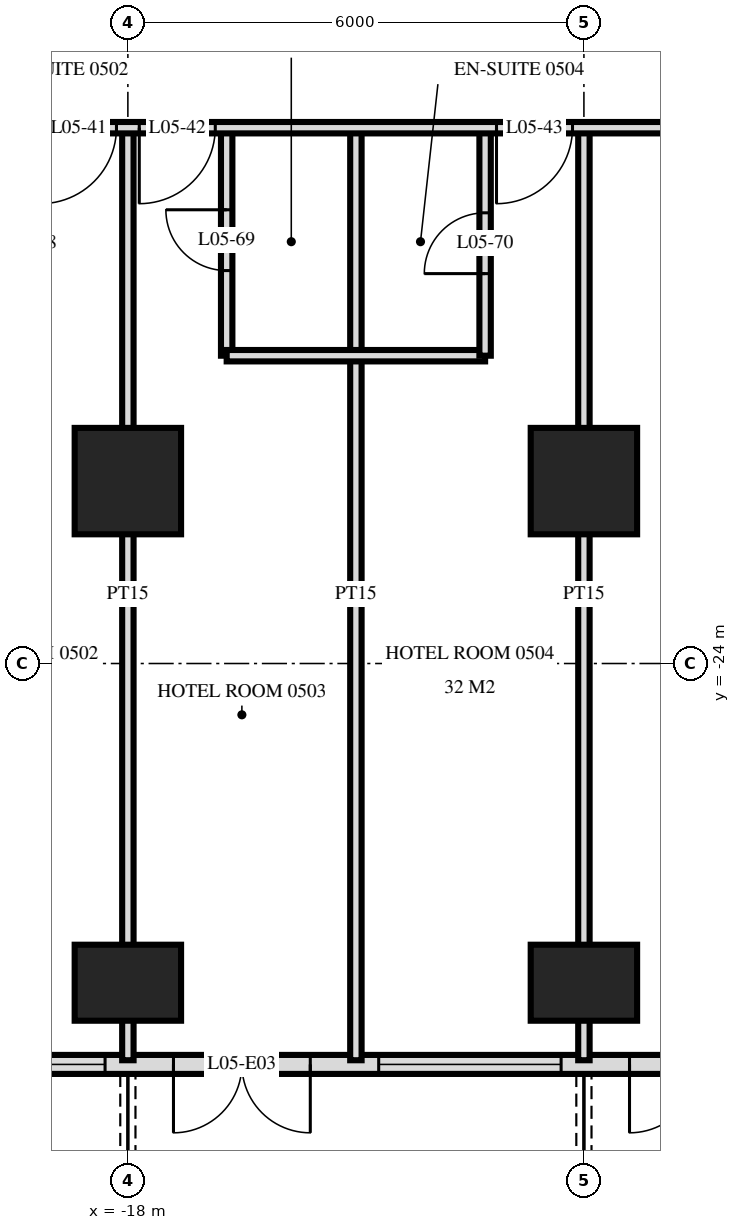
"""IFC4 building model, lengths in metres.
Left out: names, types, materials, properties, quantities, classifications, styles, units other than length and angle.
Written with IfcOpenShell. Run it as: python <this file> out.ifc"""

import sys

from ifc_helpers import new_model, si_unit, direction, frame, frame_2d, origin, origin_2d, place, context, subcontext, project, spatial, rectangle, extrude, element, fill, save


model = new_model("IFC4")
c1 = context("Model", 3, precision=1e-05, world=origin(), true_north=direction((0.0, 1.0)))
c2 = subcontext(c1, "Body", "Model", "MODEL_VIEW")
j1 = project(units=[si_unit("LENGTHUNIT", "METRE"), si_unit("PLANEANGLEUNIT", "RADIAN")], contexts=[c1])
p1 = place(None, origin())
s1 = spatial("IfcSite", under=j1, at=p1, CompositionType="ELEMENT")
p2 = place(p1, origin())
s2 = spatial("IfcBuilding", under=s1, at=p2, CompositionType="ELEMENT")
p3 = place(p2, frame((0.0, 0.0, 27.6)))
s3 = spatial("IfcBuildingStorey", under=s2, at=p3, CompositionType="ELEMENT", Elevation=27.6)
p4 = place(p3, frame((-18.0, -28.2, 0.0), z_axis=(0.0, 0.0, 1.0), x_axis=(1.0, 0.0, 0.0)))
e1 = element("IfcColumn", 1, at=p4, inside=s3, PredefinedType="COLUMN", context=c2, shape_type="SweptSolid", body=[
    extrude(rectangle(XDim=1.4, YDim=1.0, at=origin_2d()), origin(), (0.0, 0.0, 1.0), 3.6),
])
p5 = place(p3, frame((-18.0, -21.6, 0.0), z_axis=(0.0, 0.0, 1.0), x_axis=(1.0, 0.0, 0.0)))
e2 = element("IfcColumn", 2, at=p5, inside=s3, PredefinedType="COLUMN", context=c2, shape_type="SweptSolid", body=[
    extrude(rectangle(XDim=1.4, YDim=1.4, at=origin_2d()), origin(), (0.0, 0.0, 1.0), 3.6),
])
p6 = place(p3, frame((-12.0, -28.2, 0.0), z_axis=(0.0, 0.0, 1.0), x_axis=(1.0, 0.0, 0.0)))
e3 = element("IfcColumn", 3, at=p6, inside=s3, PredefinedType="COLUMN", context=c2, shape_type="SweptSolid", body=[
    extrude(rectangle(XDim=1.4, YDim=1.0, at=origin_2d()), origin(), (0.0, 0.0, 1.0), 3.6),
])
p7 = place(p3, frame((-12.0, -21.6, 0.0), z_axis=(0.0, 0.0, 1.0), x_axis=(1.0, 0.0, 0.0)))
e4 = element("IfcColumn", 4, at=p7, inside=s3, PredefinedType="COLUMN", context=c2, shape_type="SweptSolid", body=[
    extrude(rectangle(XDim=1.4, YDim=1.4, at=origin_2d()), origin(), (0.0, 0.0, 1.0), 3.6),
])
p8 = place(p3, frame((-28.775, -29.275, 0.0), z_axis=(0.0, 0.0, 1.0), x_axis=(1.0, 0.0, 0.0)))
e5 = element("IfcWall", 5, at=p8, inside=s3, PredefinedType="SOLIDWALL", context=c2, shape_type="SweptSolid", body=[
    extrude(rectangle(XDim=57.551, YDim=0.25, at=frame_2d((28.775, 0.0))), origin(), (0.0, 0.0, 1.0), 3.32),
])
p9 = place(p8, frame((0.575, 0.0, 0.0)))
e6 = element("IfcOpeningElement", 6, at=p9, cuts=e5, PredefinedType="OPENING", context=c2, shape_type="SweptSolid", body=[
    extrude(rectangle(XDim=1.8, YDim=2.4, at=frame_2d((0.9, 1.2))), frame((0.0, 0.135, 0.0), z_axis=(0.0, -1.0, 0.0), x_axis=(1.0, 0.0, 0.0)), (0.0, 0.0, 1.0), 0.27),
])
p10 = place(p8, frame((5.375, 0.0, 0.0)))
e7 = element("IfcOpeningElement", 7, at=p10, cuts=e5, PredefinedType="OPENING", context=c2, shape_type="SweptSolid", body=[
    extrude(rectangle(XDim=1.8, YDim=2.4, at=frame_2d((0.9, 1.2))), frame((0.0, 0.135, 0.0), z_axis=(0.0, -1.0, 0.0), x_axis=(1.0, 0.0, 0.0)), (0.0, 0.0, 1.0), 0.27),
])
p11 = place(p8, frame((8.075, 0.0, 0.3)))
e8 = element("IfcOpeningElement", 8, at=p11, cuts=e5, PredefinedType="OPENING", context=c2, shape_type="SweptSolid", body=[
    extrude(rectangle(XDim=2.4, YDim=2.1, at=frame_2d((1.2, 1.05))), frame((0.0, 0.135, 0.0), z_axis=(0.0, -1.0, 0.0), x_axis=(1.0, 0.0, 0.0)), (0.0, 0.0, 1.0), 0.27),
])
p12 = place(p8, frame((11.375, 0.0, 0.0)))
e9 = element("IfcOpeningElement", 9, at=p12, cuts=e5, PredefinedType="OPENING", context=c2, shape_type="SweptSolid", body=[
    extrude(rectangle(XDim=1.8, YDim=2.4, at=frame_2d((0.9, 1.2))), frame((0.0, 0.135, 0.0), z_axis=(0.0, -1.0, 0.0), x_axis=(1.0, 0.0, 0.0)), (0.0, 0.0, 1.0), 0.27),
])
p13 = place(p8, frame((14.075, 0.0, 0.3)))
e10 = element("IfcOpeningElement", 10, at=p13, cuts=e5, PredefinedType="OPENING", context=c2, shape_type="SweptSolid", body=[
    extrude(rectangle(XDim=2.4, YDim=2.1, at=frame_2d((1.2, 1.05))), frame((0.0, 0.135, 0.0), z_axis=(0.0, -1.0, 0.0), x_axis=(1.0, 0.0, 0.0)), (0.0, 0.0, 1.0), 0.27),
])
p14 = place(p8, frame((17.375, 0.0, 0.0)))
e11 = element("IfcOpeningElement", 11, at=p14, cuts=e5, PredefinedType="OPENING", context=c2, shape_type="SweptSolid", body=[
    extrude(rectangle(XDim=1.8, YDim=2.4, at=frame_2d((0.9, 1.2))), frame((0.0, 0.135, 0.0), z_axis=(0.0, -1.0, 0.0), x_axis=(1.0, 0.0, 0.0)), (0.0, 0.0, 1.0), 0.27),
])
p15 = place(p8, frame((20.075, 0.0, 0.3)))
e12 = element("IfcOpeningElement", 12, at=p15, cuts=e5, PredefinedType="OPENING", context=c2, shape_type="SweptSolid", body=[
    extrude(rectangle(XDim=2.4, YDim=2.1, at=frame_2d((1.2, 1.05))), frame((0.0, 0.135, 0.0), z_axis=(0.0, -1.0, 0.0), x_axis=(1.0, 0.0, 0.0)), (0.0, 0.0, 1.0), 0.27),
])
p16 = place(p8, frame((23.075, 0.0, 0.3)))
e13 = element("IfcOpeningElement", 13, at=p16, cuts=e5, PredefinedType="OPENING", context=c2, shape_type="SweptSolid", body=[
    extrude(rectangle(XDim=2.4, YDim=2.1, at=frame_2d((1.2, 1.05))), frame((0.0, 0.135, 0.0), z_axis=(0.0, -1.0, 0.0), x_axis=(1.0, 0.0, 0.0)), (0.0, 0.0, 1.0), 0.27),
])
p17 = place(p8, frame((26.375, 0.0, 0.0)))
e14 = element("IfcOpeningElement", 14, at=p17, cuts=e5, PredefinedType="OPENING", context=c2, shape_type="SweptSolid", body=[
    extrude(rectangle(XDim=1.8, YDim=2.4, at=frame_2d((0.9, 1.2))), frame((0.0, 0.135, 0.0), z_axis=(0.0, -1.0, 0.0), x_axis=(1.0, 0.0, 0.0)), (0.0, 0.0, 1.0), 0.27),
])
p18 = place(p8, frame((29.375, 0.0, 0.0)))
e15 = element("IfcOpeningElement", 15, at=p18, cuts=e5, PredefinedType="OPENING", context=c2, shape_type="SweptSolid", body=[
    extrude(rectangle(XDim=1.8, YDim=2.4, at=frame_2d((0.9, 1.2))), frame((0.0, 0.135, 0.0), z_axis=(0.0, -1.0, 0.0), x_axis=(1.0, 0.0, 0.0)), (0.0, 0.0, 1.0), 0.27),
])
p19 = place(p8, frame((32.075, 0.0, 0.3)))
e16 = element("IfcOpeningElement", 16, at=p19, cuts=e5, PredefinedType="OPENING", context=c2, shape_type="SweptSolid", body=[
    extrude(rectangle(XDim=2.4, YDim=2.1, at=frame_2d((1.2, 1.05))), frame((0.0, 0.135, 0.0), z_axis=(0.0, -1.0, 0.0), x_axis=(1.0, 0.0, 0.0)), (0.0, 0.0, 1.0), 0.27),
])
p20 = place(p8, frame((35.375, 0.0, 0.0)))
e17 = element("IfcOpeningElement", 17, at=p20, cuts=e5, PredefinedType="OPENING", context=c2, shape_type="SweptSolid", body=[
    extrude(rectangle(XDim=1.8, YDim=2.4, at=frame_2d((0.9, 1.2))), frame((0.0, 0.135, 0.0), z_axis=(0.0, -1.0, 0.0), x_axis=(1.0, 0.0, 0.0)), (0.0, 0.0, 1.0), 0.27),
])
p21 = place(p8, frame((38.075, 0.0, 0.3)))
e18 = element("IfcOpeningElement", 18, at=p21, cuts=e5, PredefinedType="OPENING", context=c2, shape_type="SweptSolid", body=[
    extrude(rectangle(XDim=2.4, YDim=2.1, at=frame_2d((1.2, 1.05))), frame((0.0, 0.135, 0.0), z_axis=(0.0, -1.0, 0.0), x_axis=(1.0, 0.0, 0.0)), (0.0, 0.0, 1.0), 0.27),
])
p22 = place(p8, frame((41.375, 0.0, 0.0)))
e19 = element("IfcOpeningElement", 19, at=p22, cuts=e5, PredefinedType="OPENING", context=c2, shape_type="SweptSolid", body=[
    extrude(rectangle(XDim=1.8, YDim=2.4, at=frame_2d((0.9, 1.2))), frame((0.0, 0.135, 0.0), z_axis=(0.0, -1.0, 0.0), x_axis=(1.0, 0.0, 0.0)), (0.0, 0.0, 1.0), 0.27),
])
p23 = place(p8, frame((44.075, 0.0, 0.3)))
e20 = element("IfcOpeningElement", 20, at=p23, cuts=e5, PredefinedType="OPENING", context=c2, shape_type="SweptSolid", body=[
    extrude(rectangle(XDim=2.4, YDim=2.1, at=frame_2d((1.2, 1.05))), frame((0.0, 0.135, 0.0), z_axis=(0.0, -1.0, 0.0), x_axis=(1.0, 0.0, 0.0)), (0.0, 0.0, 1.0), 0.27),
])
p24 = place(p8, frame((47.075, 0.0, 0.3)))
e21 = element("IfcOpeningElement", 21, at=p24, cuts=e5, PredefinedType="OPENING", context=c2, shape_type="SweptSolid", body=[
    extrude(rectangle(XDim=2.4, YDim=2.1, at=frame_2d((1.2, 1.05))), frame((0.0, 0.135, 0.0), z_axis=(0.0, -1.0, 0.0), x_axis=(1.0, 0.0, 0.0)), (0.0, 0.0, 1.0), 0.27),
])
p25 = place(p8, frame((50.375, 0.0, 0.0)))
e22 = element("IfcOpeningElement", 22, at=p25, cuts=e5, PredefinedType="OPENING", context=c2, shape_type="SweptSolid", body=[
    extrude(rectangle(XDim=1.8, YDim=2.4, at=frame_2d((0.9, 1.2))), frame((0.0, 0.135, 0.0), z_axis=(0.0, -1.0, 0.0), x_axis=(1.0, 0.0, 0.0)), (0.0, 0.0, 1.0), 0.27),
])
p26 = place(p8, frame((53.375, 0.0, 0.0)))
e23 = element("IfcOpeningElement", 23, at=p26, cuts=e5, PredefinedType="OPENING", context=c2, shape_type="SweptSolid", body=[
    extrude(rectangle(XDim=1.8, YDim=2.4, at=frame_2d((0.9, 1.2))), frame((0.0, 0.135, 0.0), z_axis=(0.0, -1.0, 0.0), x_axis=(1.0, 0.0, 0.0)), (0.0, 0.0, 1.0), 0.27),
])
p27 = place(p3, frame((-12.0, -29.22, 0.0), z_axis=(0.0, 0.0, 1.0), x_axis=(0.0, 1.0, 0.0)))
e24 = element("IfcWall", 24, at=p27, inside=s3, PredefinedType="PARTITIONING", context=c2, shape_type="SweptSolid", body=[
    extrude(rectangle(XDim=12.27, YDim=0.15, at=frame_2d((6.135, 0.0))), origin(), (0.0, 0.0, 1.0), 3.32),
])
p28 = place(p3, frame((-13.3, -19.95, 0.0), z_axis=(0.0, 0.0, 1.0), x_axis=(0.0, 1.0, 0.0)))
e25 = element("IfcWall", 25, at=p28, inside=s3, PredefinedType="PARTITIONING", context=c2, shape_type="SweptSolid", body=[
    extrude(rectangle(XDim=3.0, YDim=0.15, at=frame_2d((1.5, 0.0))), origin(), (0.0, 0.0, 1.0), 3.32),
])
p29 = place(p28, frame((1.08, 0.0, 0.0)))
e26 = element("IfcOpeningElement", 26, at=p29, cuts=e25, PredefinedType="OPENING", context=c2, shape_type="SweptSolid", body=[
    extrude(rectangle(XDim=0.8, YDim=2.1, at=frame_2d((0.4, 1.05))), frame((0.0, 0.085, 0.0), z_axis=(0.0, -1.0, 0.0), x_axis=(1.0, 0.0, 0.0)), (0.0, 0.0, 1.0), 0.17),
])
p30 = place(p3, frame((-15.0, -29.22, 0.0), z_axis=(0.0, 0.0, 1.0), x_axis=(0.0, 1.0, 0.0)))
e27 = element("IfcWall", 27, at=p30, inside=s3, PredefinedType="PARTITIONING", context=c2, shape_type="SweptSolid", body=[
    extrude(rectangle(XDim=12.27, YDim=0.15, at=frame_2d((6.135, 0.0))), origin(), (0.0, 0.0, 1.0), 3.32),
])
p31 = place(p3, frame((-16.7, -19.95, 0.0), z_axis=(0.0, 0.0, 1.0), x_axis=(0.0, 1.0, 0.0)))
e28 = element("IfcWall", 28, at=p31, inside=s3, PredefinedType="PARTITIONING", context=c2, shape_type="SweptSolid", body=[
    extrude(rectangle(XDim=3.0, YDim=0.15, at=frame_2d((1.5, 0.0))), origin(), (0.0, 0.0, 1.0), 3.32),
])
p32 = place(p31, frame((1.12, 0.0, 0.0)))
e29 = element("IfcOpeningElement", 29, at=p32, cuts=e28, PredefinedType="OPENING", context=c2, shape_type="SweptSolid", body=[
    extrude(rectangle(XDim=0.8, YDim=2.1, at=frame_2d((0.4, 1.05))), frame((0.0, 0.085, 0.0), z_axis=(0.0, -1.0, 0.0), x_axis=(1.0, 0.0, 0.0)), (0.0, 0.0, 1.0), 0.17),
])
p33 = place(p3, frame((-18.0, -29.22, 0.0), z_axis=(0.0, 0.0, 1.0), x_axis=(0.0, 1.0, 0.0)))
e30 = element("IfcWall", 30, at=p33, inside=s3, PredefinedType="PARTITIONING", context=c2, shape_type="SweptSolid", body=[
    extrude(rectangle(XDim=12.27, YDim=0.15, at=frame_2d((6.135, 0.0))), origin(), (0.0, 0.0, 1.0), 3.32),
])
p34 = place(p3, frame((-16.7, -19.95, 0.0), z_axis=(0.0, 0.0, 1.0), x_axis=(1.0, 0.0, 0.0)))
e31 = element("IfcWall", 31, at=p34, inside=s3, PredefinedType="PARTITIONING", context=c2, shape_type="SweptSolid", body=[
    extrude(rectangle(XDim=3.4, YDim=0.15, at=frame_2d((1.7, 0.0))), origin(), (0.0, 0.0, 1.0), 3.32),
])
p35 = place(p3, frame((-33.12, -16.95, 0.0), z_axis=(0.0, 0.0, 1.0), x_axis=(1.0, 0.0, 0.0)))
e32 = element("IfcWall", 32, at=p35, inside=s3, PredefinedType="PARTITIONING", context=c2, shape_type="SweptSolid", body=[
    extrude(rectangle(XDim=66.24, YDim=0.15, at=frame_2d((33.12, 0.0))), origin(), (0.0, 0.0, 1.0), 3.32),
])
p36 = place(p35, frame((9.27, 0.0, 0.0)))
e33 = element("IfcOpeningElement", 33, at=p36, cuts=e32, PredefinedType="OPENING", context=c2, shape_type="SweptSolid", body=[
    extrude(rectangle(XDim=1.0, YDim=2.1, at=frame_2d((0.5, 1.05))), frame((0.0, 0.085, 0.0), z_axis=(0.0, -1.0, 0.0), x_axis=(1.0, 0.0, 0.0)), (0.0, 0.0, 1.0), 0.17),
])
p37 = place(p35, frame((13.97, 0.0, 0.0)))
e34 = element("IfcOpeningElement", 34, at=p37, cuts=e32, PredefinedType="OPENING", context=c2, shape_type="SweptSolid", body=[
    extrude(rectangle(XDim=1.0, YDim=2.1, at=frame_2d((0.5, 1.05))), frame((0.0, 0.085, 0.0), z_axis=(0.0, -1.0, 0.0), x_axis=(1.0, 0.0, 0.0)), (0.0, 0.0, 1.0), 0.17),
])
p38 = place(p35, frame((15.27, 0.0, 0.0)))
e35 = element("IfcOpeningElement", 35, at=p38, cuts=e32, PredefinedType="OPENING", context=c2, shape_type="SweptSolid", body=[
    extrude(rectangle(XDim=1.0, YDim=2.1, at=frame_2d((0.5, 1.05))), frame((0.0, 0.085, 0.0), z_axis=(0.0, -1.0, 0.0), x_axis=(1.0, 0.0, 0.0)), (0.0, 0.0, 1.0), 0.17),
])
p39 = place(p35, frame((19.97, 0.0, 0.0)))
e36 = element("IfcOpeningElement", 36, at=p39, cuts=e32, PredefinedType="OPENING", context=c2, shape_type="SweptSolid", body=[
    extrude(rectangle(XDim=1.0, YDim=2.1, at=frame_2d((0.5, 1.05))), frame((0.0, 0.085, 0.0), z_axis=(0.0, -1.0, 0.0), x_axis=(1.0, 0.0, 0.0)), (0.0, 0.0, 1.0), 0.17),
])
p40 = place(p35, frame((22.27, 0.0, 0.0)))
e37 = element("IfcOpeningElement", 37, at=p40, cuts=e32, PredefinedType="OPENING", context=c2, shape_type="SweptSolid", body=[
    extrude(rectangle(XDim=1.0, YDim=2.1, at=frame_2d((0.5, 1.05))), frame((0.0, 0.085, 0.0), z_axis=(0.0, -1.0, 0.0), x_axis=(1.0, 0.0, 0.0)), (0.0, 0.0, 1.0), 0.17),
])
p41 = place(p35, frame((28.97, 0.0, 0.0)))
e38 = element("IfcOpeningElement", 38, at=p41, cuts=e32, PredefinedType="OPENING", context=c2, shape_type="SweptSolid", body=[
    extrude(rectangle(XDim=1.0, YDim=2.1, at=frame_2d((0.5, 1.05))), frame((0.0, 0.085, 0.0), z_axis=(0.0, -1.0, 0.0), x_axis=(1.0, 0.0, 0.0)), (0.0, 0.0, 1.0), 0.17),
])
p42 = place(p35, frame((30.27, 0.0, 0.0)))
e39 = element("IfcOpeningElement", 39, at=p42, cuts=e32, PredefinedType="OPENING", context=c2, shape_type="SweptSolid", body=[
    extrude(rectangle(XDim=1.0, YDim=2.1, at=frame_2d((0.5, 1.05))), frame((0.0, 0.085, 0.0), z_axis=(0.0, -1.0, 0.0), x_axis=(1.0, 0.0, 0.0)), (0.0, 0.0, 1.0), 0.17),
])
p43 = place(p35, frame((34.97, 0.0, 0.0)))
e40 = element("IfcOpeningElement", 40, at=p43, cuts=e32, PredefinedType="OPENING", context=c2, shape_type="SweptSolid", body=[
    extrude(rectangle(XDim=1.0, YDim=2.1, at=frame_2d((0.5, 1.05))), frame((0.0, 0.085, 0.0), z_axis=(0.0, -1.0, 0.0), x_axis=(1.0, 0.0, 0.0)), (0.0, 0.0, 1.0), 0.17),
])
p44 = place(p35, frame((36.27, 0.0, 0.0)))
e41 = element("IfcOpeningElement", 41, at=p44, cuts=e32, PredefinedType="OPENING", context=c2, shape_type="SweptSolid", body=[
    extrude(rectangle(XDim=1.0, YDim=2.1, at=frame_2d((0.5, 1.05))), frame((0.0, 0.085, 0.0), z_axis=(0.0, -1.0, 0.0), x_axis=(1.0, 0.0, 0.0)), (0.0, 0.0, 1.0), 0.17),
])
p45 = place(p35, frame((40.97, 0.0, 0.0)))
e42 = element("IfcOpeningElement", 42, at=p45, cuts=e32, PredefinedType="OPENING", context=c2, shape_type="SweptSolid", body=[
    extrude(rectangle(XDim=1.0, YDim=2.1, at=frame_2d((0.5, 1.05))), frame((0.0, 0.085, 0.0), z_axis=(0.0, -1.0, 0.0), x_axis=(1.0, 0.0, 0.0)), (0.0, 0.0, 1.0), 0.17),
])
p46 = place(p35, frame((42.27, 0.0, 0.0)))
e43 = element("IfcOpeningElement", 43, at=p46, cuts=e32, PredefinedType="OPENING", context=c2, shape_type="SweptSolid", body=[
    extrude(rectangle(XDim=1.0, YDim=2.1, at=frame_2d((0.5, 1.05))), frame((0.0, 0.085, 0.0), z_axis=(0.0, -1.0, 0.0), x_axis=(1.0, 0.0, 0.0)), (0.0, 0.0, 1.0), 0.17),
])
p47 = place(p35, frame((46.97, 0.0, 0.0)))
e44 = element("IfcOpeningElement", 44, at=p47, cuts=e32, PredefinedType="OPENING", context=c2, shape_type="SweptSolid", body=[
    extrude(rectangle(XDim=1.0, YDim=2.1, at=frame_2d((0.5, 1.05))), frame((0.0, 0.085, 0.0), z_axis=(0.0, -1.0, 0.0), x_axis=(1.0, 0.0, 0.0)), (0.0, 0.0, 1.0), 0.17),
])
p48 = place(p35, frame((48.27, 0.0, 0.0)))
e45 = element("IfcOpeningElement", 45, at=p48, cuts=e32, PredefinedType="OPENING", context=c2, shape_type="SweptSolid", body=[
    extrude(rectangle(XDim=1.0, YDim=2.1, at=frame_2d((0.5, 1.05))), frame((0.0, 0.085, 0.0), z_axis=(0.0, -1.0, 0.0), x_axis=(1.0, 0.0, 0.0)), (0.0, 0.0, 1.0), 0.17),
])
p49 = place(p35, frame((52.97, 0.0, 0.0)))
e46 = element("IfcOpeningElement", 46, at=p49, cuts=e32, PredefinedType="OPENING", context=c2, shape_type="SweptSolid", body=[
    extrude(rectangle(XDim=1.0, YDim=2.1, at=frame_2d((0.5, 1.05))), frame((0.0, 0.085, 0.0), z_axis=(0.0, -1.0, 0.0), x_axis=(1.0, 0.0, 0.0)), (0.0, 0.0, 1.0), 0.17),
])
p50 = place(p35, frame((54.27, 0.0, 0.0)))
e47 = element("IfcOpeningElement", 47, at=p50, cuts=e32, PredefinedType="OPENING", context=c2, shape_type="SweptSolid", body=[
    extrude(rectangle(XDim=1.0, YDim=2.1, at=frame_2d((0.5, 1.05))), frame((0.0, 0.085, 0.0), z_axis=(0.0, -1.0, 0.0), x_axis=(1.0, 0.0, 0.0)), (0.0, 0.0, 1.0), 0.17),
])
p51 = place(p35, frame((4.4, 0.0, 0.0)))
e48 = element("IfcOpeningElement", 48, at=p51, cuts=e32, PredefinedType="OPENING", context=c2, shape_type="SweptSolid", body=[
    extrude(rectangle(XDim=1.0, YDim=2.1, at=frame_2d((0.5, 1.05))), frame((0.0, 0.085, 0.0), z_axis=(0.0, -1.0, 0.0), x_axis=(1.0, 0.0, 0.0)), (0.0, 0.0, 1.0), 0.17),
])
p52 = place(p35, frame((60.8, 0.0, 0.0)))
e49 = element("IfcOpeningElement", 49, at=p52, cuts=e32, PredefinedType="OPENING", context=c2, shape_type="SweptSolid", body=[
    extrude(rectangle(XDim=1.0, YDim=2.1, at=frame_2d((0.5, 1.05))), frame((0.0, 0.085, 0.0), z_axis=(0.0, -1.0, 0.0), x_axis=(1.0, 0.0, 0.0)), (0.0, 0.0, 1.0), 0.17),
])
p53 = place(p11, origin())
e50 = element("IfcWindow", 50, at=p53, inside=s3, PartitioningType="SINGLE_PANEL", PredefinedType="WINDOW", context=c2, shape_type="SweptSolid", body=[
    extrude(rectangle(XDim=2.4, YDim=2.1, at=frame_2d((1.2, 1.05))), frame((0.0, 0.03, 0.0), z_axis=(0.0, -1.0, 0.0), x_axis=(1.0, 0.0, 0.0)), (0.0, 0.0, 1.0), 0.06),
])
fill(e8, e50)
p54 = place(p12, frame((0.9, 0.0, 0.0), z_axis=(0.0, 0.0, 1.0), x_axis=(-1.0, 0.0, 0.0)))
e51 = element("IfcDoor", 51, at=p54, inside=s3, OperationType="DOUBLE_DOOR_SINGLE_SWING", PredefinedType="DOOR", context=c2, shape_type="SweptSolid", body=[
    extrude(rectangle(XDim=1.8, YDim=2.4, at=frame_2d((0.0, 1.2))), frame((0.0, -0.025, 0.0), z_axis=(0.0, 1.0, 0.0), x_axis=(-1.0, 0.0, 0.0)), (0.0, 0.0, 1.0), 0.05),
])
fill(e9, e51)
p55 = place(p13, origin())
e52 = element("IfcWindow", 52, at=p55, inside=s3, PartitioningType="SINGLE_PANEL", PredefinedType="WINDOW", context=c2, shape_type="SweptSolid", body=[
    extrude(rectangle(XDim=2.4, YDim=2.1, at=frame_2d((1.2, 1.05))), frame((0.0, 0.03, 0.0), z_axis=(0.0, -1.0, 0.0), x_axis=(1.0, 0.0, 0.0)), (0.0, 0.0, 1.0), 0.06),
])
fill(e10, e52)
p56 = place(p14, frame((0.9, 0.0, 0.0), z_axis=(0.0, 0.0, 1.0), x_axis=(-1.0, 0.0, 0.0)))
e53 = element("IfcDoor", 53, at=p56, inside=s3, OperationType="DOUBLE_DOOR_SINGLE_SWING", PredefinedType="DOOR", context=c2, shape_type="SweptSolid", body=[
    extrude(rectangle(XDim=1.8, YDim=2.4, at=frame_2d((0.0, 1.2))), frame((0.0, -0.025, 0.0), z_axis=(0.0, 1.0, 0.0), x_axis=(-1.0, 0.0, 0.0)), (0.0, 0.0, 1.0), 0.05),
])
fill(e11, e53)
p57 = place(p37, frame((0.5, 0.0, 0.0), z_axis=(0.0, 0.0, 1.0), x_axis=(-1.0, 0.0, 0.0)))
e54 = element("IfcDoor", 54, at=p57, inside=s3, OperationType="SINGLE_SWING_LEFT", PredefinedType="DOOR", context=c2, shape_type="SweptSolid", body=[
    extrude(rectangle(XDim=1.0, YDim=2.1, at=frame_2d((0.0, 1.05))), frame((0.0, -0.025, 0.0), z_axis=(0.0, 1.0, 0.0), x_axis=(-1.0, 0.0, 0.0)), (0.0, 0.0, 1.0), 0.05),
])
fill(e34, e54)
p58 = place(p38, frame((0.5, 0.0, 0.0), z_axis=(0.0, 0.0, 1.0), x_axis=(-1.0, 0.0, 0.0)))
e55 = element("IfcDoor", 55, at=p58, inside=s3, OperationType="SINGLE_SWING_LEFT", PredefinedType="DOOR", context=c2, shape_type="SweptSolid", body=[
    extrude(rectangle(XDim=1.0, YDim=2.1, at=frame_2d((0.0, 1.05))), frame((0.0, -0.025, 0.0), z_axis=(0.0, 1.0, 0.0), x_axis=(-1.0, 0.0, 0.0)), (0.0, 0.0, 1.0), 0.05),
])
fill(e35, e55)
p59 = place(p39, frame((0.5, 0.0, 0.0), z_axis=(0.0, 0.0, 1.0), x_axis=(-1.0, 0.0, 0.0)))
e56 = element("IfcDoor", 56, at=p59, inside=s3, OperationType="SINGLE_SWING_LEFT", PredefinedType="DOOR", context=c2, shape_type="SweptSolid", body=[
    extrude(rectangle(XDim=1.0, YDim=2.1, at=frame_2d((0.0, 1.05))), frame((0.0, -0.025, 0.0), z_axis=(0.0, 1.0, 0.0), x_axis=(-1.0, 0.0, 0.0)), (0.0, 0.0, 1.0), 0.05),
])
fill(e36, e56)
p60 = place(p32, origin())
e57 = element("IfcDoor", 57, at=p60, inside=s3, OperationType="SINGLE_SWING_LEFT", PredefinedType="DOOR", context=c2, shape_type="SweptSolid", body=[
    extrude(rectangle(XDim=0.8, YDim=2.1, at=frame_2d((0.4, 1.05))), frame((0.0, 0.025, 0.0), z_axis=(0.0, -1.0, 0.0), x_axis=(1.0, 0.0, 0.0)), (0.0, 0.0, 1.0), 0.05),
])
fill(e29, e57)
p61 = place(p29, origin())
e58 = element("IfcDoor", 58, at=p61, inside=s3, OperationType="SINGLE_SWING_RIGHT", PredefinedType="DOOR", context=c2, shape_type="SweptSolid", body=[
    extrude(rectangle(XDim=0.8, YDim=2.1, at=frame_2d((0.4, 1.05))), frame((0.0, 0.025, 0.0), z_axis=(0.0, -1.0, 0.0), x_axis=(1.0, 0.0, 0.0)), (0.0, 0.0, 1.0), 0.05),
])
fill(e26, e58)
save(model, sys.argv[1])
